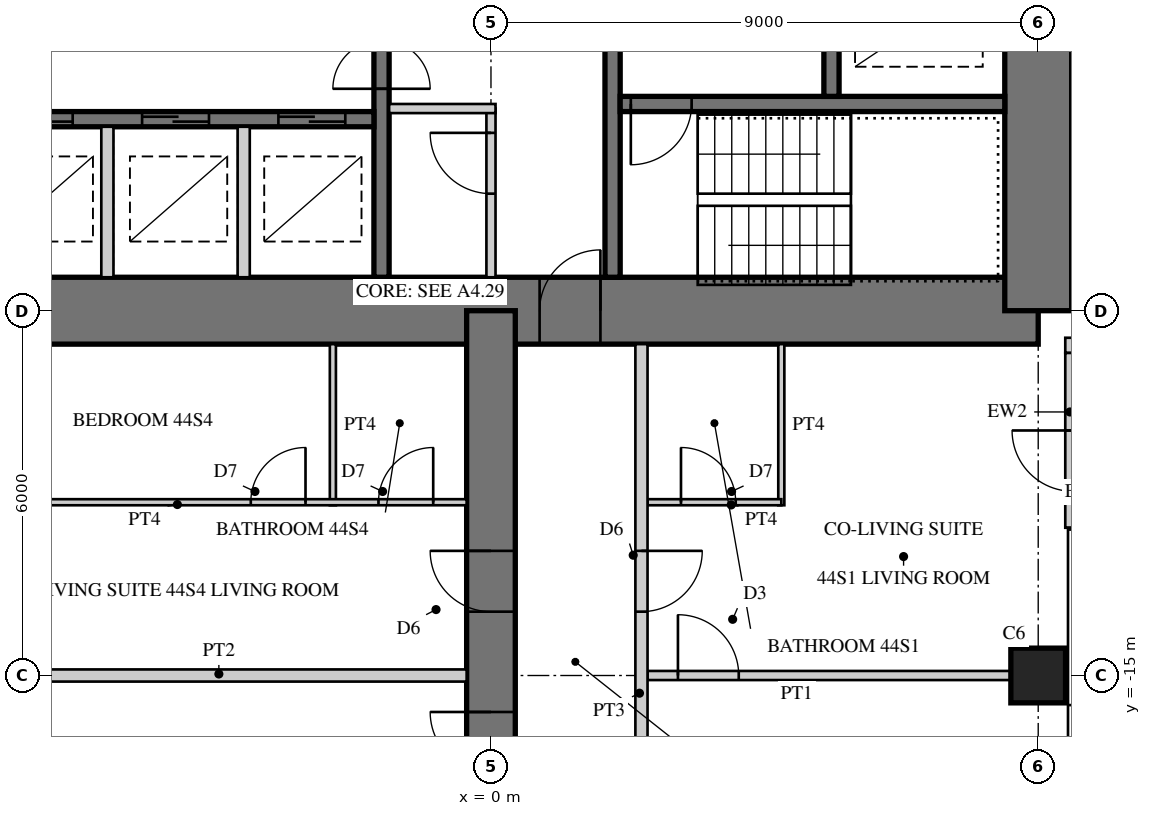
"""IFC4 building model, lengths in metres.
Left out: names, types, materials, properties, quantities, classifications, styles, units other than length and angle.
Written with IfcOpenShell. Run it as: python <this file> out.ifc"""

import sys

from ifc_helpers import new_model, si_unit, direction, frame, frame_2d, origin, origin_2d, place, context, subcontext, project, spatial, rectangle, hollow_rectangle, extrude, element, fill, save


model = new_model("IFC4")
c1 = context("Model", 3, precision=1e-05, world=origin(), true_north=direction((0.0, 1.0)))
c2 = subcontext(c1, "Body", "Model", "MODEL_VIEW")
j1 = project(units=[si_unit("LENGTHUNIT", "METRE"), si_unit("PLANEANGLEUNIT", "RADIAN")], contexts=[c1])
p1 = place(None, origin())
s1 = spatial("IfcSite", under=j1, at=p1, CompositionType="ELEMENT")
p2 = place(p1, origin())
s2 = spatial("IfcBuilding", under=s1, at=p2, CompositionType="ELEMENT")
p3 = place(p2, frame((0.0, 0.0, 179.7)))
s3 = spatial("IfcBuildingStorey", under=s2, at=p3, CompositionType="ELEMENT", Elevation=179.7)
p4 = place(p3, frame((-9.0, -9.0, 0.0), z_axis=(0.0, 0.0, 1.0), x_axis=(1.0, 0.0, 0.0)))
e1 = element("IfcWall", 1, at=p4, inside=s3, PredefinedType="SHEAR", context=c2, shape_type="SweptSolid", body=[
    extrude(rectangle(XDim=18.0, YDim=1.1, at=frame_2d((9.0, 0.0))), origin(), (0.0, 0.0, 1.0), 3.4),
])
p5 = place(p4, frame((9.8, 0.0, 0.0)))
e2 = element("IfcOpeningElement", 2, at=p5, cuts=e1, PredefinedType="OPENING", context=c2, shape_type="SweptSolid", body=[
    extrude(rectangle(XDim=1.0, YDim=2.4, at=frame_2d((0.5, 1.2))), frame((0.0, 0.56, 0.0), z_axis=(0.0, -1.0, 0.0), x_axis=(1.0, 0.0, 0.0)), (0.0, 0.0, 1.0), 1.12),
])
p6 = place(p3, frame((9.0, -9.0, 0.0), z_axis=(0.0, 0.0, 1.0), x_axis=(0.0, 1.0, 0.0)))
e3 = element("IfcWall", 3, at=p6, inside=s3, PredefinedType="SHEAR", context=c2, shape_type="SweptSolid", body=[
    extrude(rectangle(XDim=18.0, YDim=1.1, at=frame_2d((9.0, 0.0))), origin(), (0.0, 0.0, 1.0), 3.4),
])
p7 = place(p6, frame((9.8, 0.0, 0.0)))
e4 = element("IfcOpeningElement", 4, at=p7, cuts=e3, PredefinedType="OPENING", context=c2, shape_type="SweptSolid", body=[
    extrude(rectangle(XDim=1.0, YDim=2.4, at=frame_2d((0.5, 1.2))), frame((0.0, 0.56, 0.0), z_axis=(0.0, -1.0, 0.0), x_axis=(1.0, 0.0, 0.0)), (0.0, 0.0, 1.0), 1.12),
])
p8 = place(p3, frame((-1.8, -1.875, 0.0), z_axis=(0.0, 0.0, 1.0), x_axis=(0.0, -1.0, 0.0)))
e5 = element("IfcWall", 5, at=p8, inside=s3, PredefinedType="SHEAR", context=c2, shape_type="SweptSolid", body=[
    extrude(rectangle(XDim=6.575, YDim=0.25, at=frame_2d((3.288, 0.0))), origin(), (0.0, 0.0, 1.0), 3.4),
])
p9 = place(p8, frame((1.875, 0.0, 0.0)))
e6 = element("IfcOpeningElement", 6, at=p9, cuts=e5, PredefinedType="OPENING", context=c2, shape_type="SweptSolid", body=[
    extrude(rectangle(XDim=1.6, YDim=2.4, at=frame_2d((0.8, 1.2))), frame((0.0, 0.135, 0.0), z_axis=(0.0, -1.0, 0.0), x_axis=(1.0, 0.0, 0.0)), (0.0, 0.0, 1.0), 0.27),
])
p10 = place(p3, frame((-1.925, -5.85, 0.0), z_axis=(0.0, 0.0, 1.0), x_axis=(-1.0, 0.0, 0.0)))
e7 = element("IfcWall", 7, at=p10, inside=s3, PredefinedType="SHEAR", context=c2, shape_type="SweptSolid", body=[
    extrude(rectangle(XDim=6.525, YDim=0.25, at=frame_2d((3.262, 0.0))), origin(), (0.0, 0.0, 1.0), 3.4),
])
p11 = place(p10, frame((0.471, 0.0, 0.0)))
e8 = element("IfcOpeningElement", 8, at=p11, cuts=e7, PredefinedType="OPENING", context=c2, shape_type="SweptSolid", body=[
    extrude(rectangle(XDim=1.1, YDim=2.2, at=frame_2d((0.55, 1.1))), frame((0.0, 0.135, 0.0), z_axis=(0.0, -1.0, 0.0), x_axis=(1.0, 0.0, 0.0)), (0.0, 0.0, 1.0), 0.27),
])
p12 = place(p10, frame((2.712, 0.0, 0.0)))
e9 = element("IfcOpeningElement", 9, at=p12, cuts=e7, PredefinedType="OPENING", context=c2, shape_type="SweptSolid", body=[
    extrude(rectangle(XDim=1.1, YDim=2.2, at=frame_2d((0.55, 1.1))), frame((0.0, 0.135, 0.0), z_axis=(0.0, -1.0, 0.0), x_axis=(1.0, 0.0, 0.0)), (0.0, 0.0, 1.0), 0.27),
])
p13 = place(p10, frame((4.954, 0.0, 0.0)))
e10 = element("IfcOpeningElement", 10, at=p13, cuts=e7, PredefinedType="OPENING", context=c2, shape_type="SweptSolid", body=[
    extrude(rectangle(XDim=1.1, YDim=2.2, at=frame_2d((0.55, 1.1))), frame((0.0, 0.135, 0.0), z_axis=(0.0, -1.0, 0.0), x_axis=(1.0, 0.0, 0.0)), (0.0, 0.0, 1.0), 0.27),
])
for number, where, z_axis, x_axis in (
    (11, (-4.067, -5.975, 0.0), (0.0, 0.0, 1.0), (0.0, -1.0, 0.0)),
    (12, (-6.308, -5.975, 0.0), (0.0, 0.0, 1.0), (0.0, -1.0, 0.0)),
):
    element("IfcWall", number, at=place(p3, frame(where, z_axis=z_axis, x_axis=x_axis)), inside=s3, PredefinedType="PARTITIONING", context=c2, shape_type="SweptSolid", body=[
        extrude(rectangle(XDim=2.475, YDim=0.2, at=frame_2d((1.237, 0.0))), origin(), (0.0, 0.0, 1.0), 3.4),
    ])
p14 = place(p3, frame((2.0, -1.675, 0.0), z_axis=(0.0, 0.0, 1.0), x_axis=(0.0, -1.0, 0.0)))
e13 = element("IfcWall", 13, at=p14, inside=s3, PredefinedType="SHEAR", context=c2, shape_type="SweptSolid", body=[
    extrude(rectangle(XDim=6.775, YDim=0.25, at=frame_2d((3.387, 0.0))), origin(), (0.0, 0.0, 1.0), 3.4),
])
p15 = place(p14, frame((0.725, 0.0, 0.0)))
e14 = element("IfcOpeningElement", 14, at=p15, cuts=e13, PredefinedType="OPENING", context=c2, shape_type="SweptSolid", body=[
    extrude(rectangle(XDim=1.0, YDim=2.1, at=frame_2d((0.5, 1.05))), frame((0.0, 0.135, 0.0), z_axis=(0.0, -1.0, 0.0), x_axis=(1.0, 0.0, 0.0)), (0.0, 0.0, 1.0), 0.27),
])
p16 = place(p3, frame((2.125, -5.6, 0.0), z_axis=(0.0, 0.0, 1.0), x_axis=(1.0, 0.0, 0.0)))
e15 = element("IfcWall", 15, at=p16, inside=s3, PredefinedType="SHEAR", context=c2, shape_type="SweptSolid", body=[
    extrude(rectangle(XDim=6.325, YDim=0.25, at=frame_2d((3.163, 0.0))), origin(), (0.0, 0.0, 1.0), 3.4),
])
p17 = place(p16, frame((0.175, 0.0, 0.0)))
e16 = element("IfcOpeningElement", 16, at=p17, cuts=e15, PredefinedType="OPENING", context=c2, shape_type="SweptSolid", body=[
    extrude(rectangle(XDim=1.0, YDim=2.1, at=frame_2d((0.5, 1.05))), frame((0.0, 0.135, 0.0), z_axis=(0.0, -1.0, 0.0), x_axis=(1.0, 0.0, 0.0)), (0.0, 0.0, 1.0), 0.27),
])
p18 = place(p3, frame((5.6, -1.925, 0.0), z_axis=(0.0, 0.0, 1.0), x_axis=(0.0, -1.0, 0.0)))
e17 = element("IfcWall", 17, at=p18, inside=s3, PredefinedType="SHEAR", context=c2, shape_type="SweptSolid", body=[
    extrude(rectangle(XDim=3.55, YDim=0.25, at=frame_2d((1.775, 0.0))), origin(), (0.0, 0.0, 1.0), 3.4),
])
p19 = place(p18, frame((1.525, 0.0, 0.0)))
e18 = element("IfcOpeningElement", 18, at=p19, cuts=e17, PredefinedType="OPENING", context=c2, shape_type="SweptSolid", body=[
    extrude(rectangle(XDim=1.1, YDim=2.2, at=frame_2d((0.55, 1.1))), frame((0.0, 0.135, 0.0), z_axis=(0.0, -1.0, 0.0), x_axis=(1.0, 0.0, 0.0)), (0.0, 0.0, 1.0), 0.27),
])
p20 = place(p18, frame((0.075, 0.0, 0.0)))
e19 = element("IfcOpeningElement", 19, at=p20, cuts=e17, PredefinedType="OPENING", context=c2, shape_type="SweptSolid", body=[
    extrude(rectangle(XDim=0.8, YDim=2.1, at=frame_2d((0.4, 1.05))), frame((0.0, 0.135, 0.0), z_axis=(0.0, -1.0, 0.0), x_axis=(1.0, 0.0, 0.0)), (0.0, 0.0, 1.0), 0.27),
])
p21 = place(p3, frame((0.0, -9.0, 0.0), z_axis=(0.0, 0.0, 1.0), x_axis=(0.0, -1.0, 0.0)))
e20 = element("IfcWall", 20, at=p21, inside=s3, PredefinedType="SHEAR", context=c2, shape_type="SweptSolid", body=[
    extrude(rectangle(XDim=18.0, YDim=0.8, at=frame_2d((9.0, 0.0))), origin(), (0.0, 0.0, 1.0), 3.4),
])
p22 = place(p21, frame((3.95, 0.0, 0.0)))
e21 = element("IfcOpeningElement", 21, at=p22, cuts=e20, PredefinedType="OPENING", context=c2, shape_type="SweptSolid", body=[
    extrude(rectangle(XDim=1.0, YDim=2.15, at=frame_2d((0.5, 1.075))), frame((0.0, 0.41, 0.0), z_axis=(0.0, -1.0, 0.0), x_axis=(1.0, 0.0, 0.0)), (0.0, 0.0, 1.0), 0.82),
])
p23 = place(p21, frame((6.6, 0.0, 0.0)))
e22 = element("IfcOpeningElement", 22, at=p23, cuts=e20, PredefinedType="OPENING", context=c2, shape_type="SweptSolid", body=[
    extrude(rectangle(XDim=1.0, YDim=2.15, at=frame_2d((0.5, 1.075))), frame((0.0, 0.41, 0.0), z_axis=(0.0, -1.0, 0.0), x_axis=(1.0, 0.0, 0.0)), (0.0, 0.0, 1.0), 0.82),
])
p24 = place(p21, frame((13.25, 0.0, 0.0)))
e23 = element("IfcOpeningElement", 23, at=p24, cuts=e20, PredefinedType="OPENING", context=c2, shape_type="SweptSolid", body=[
    extrude(rectangle(XDim=1.0, YDim=2.2, at=frame_2d((0.5, 1.1))), frame((0.0, 0.41, 0.0), z_axis=(0.0, -1.0, 0.0), x_axis=(1.0, 0.0, 0.0)), (0.0, 0.0, 1.0), 0.82),
])
p25 = place(p3, frame((9.0, -15.0, 0.0), z_axis=(0.0, 0.0, 1.0), x_axis=(1.0, 0.0, 0.0)))
e24 = element("IfcColumn", 24, at=p25, inside=s3, PredefinedType="COLUMN", context=c2, shape_type="SweptSolid", body=[
    extrude(rectangle(XDim=0.9, YDim=0.9, at=origin_2d()), origin(), (0.0, 0.0, 1.0), 3.4),
])
p26 = place(p3, frame((9.445, -9.57, 0.0), z_axis=(0.0, 0.0, 1.0), x_axis=(1.0, 0.0, 0.0)))
e25 = element("IfcWall", 25, at=p26, inside=s3, PredefinedType="SOLIDWALL", context=c2, shape_type="SweptSolid", body=[
    extrude(rectangle(XDim=3.125, YDim=0.25, at=frame_2d((1.562, 0.0))), origin(), (0.0, 0.0, 1.0), 3.22),
])
p27 = place(p26, frame((0.6, 0.0, 0.0)))
e26 = element("IfcOpeningElement", 26, at=p27, cuts=e25, PredefinedType="OPENING", context=c2, shape_type="SweptSolid", body=[
    extrude(rectangle(XDim=1.0, YDim=2.2, at=frame_2d((0.5, 1.1))), frame((0.0, 0.135, 0.0), z_axis=(0.0, -1.0, 0.0), x_axis=(1.0, 0.0, 0.0)), (0.0, 0.0, 1.0), 0.27),
])
p28 = place(p3, frame((9.57, -12.57, 0.0), z_axis=(0.0, 0.0, 1.0), x_axis=(0.0, 1.0, 0.0)))
e27 = element("IfcWall", 27, at=p28, inside=s3, PredefinedType="SOLIDWALL", context=c2, shape_type="SweptSolid", body=[
    extrude(rectangle(XDim=2.875, YDim=0.25, at=frame_2d((1.438, 0.0))), origin(), (0.0, 0.0, 1.0), 3.22),
])
p29 = place(p28, frame((0.6, 0.0, 0.0)))
e28 = element("IfcOpeningElement", 28, at=p29, cuts=e27, PredefinedType="OPENING", context=c2, shape_type="SweptSolid", body=[
    extrude(rectangle(XDim=1.0, YDim=2.2, at=frame_2d((0.5, 1.1))), frame((0.0, 0.135, 0.0), z_axis=(0.0, -1.0, 0.0), x_axis=(1.0, 0.0, 0.0)), (0.0, 0.0, 1.0), 0.27),
])
p30 = place(p3, frame((0.0, -5.675, 0.0), z_axis=(0.0, 0.0, 1.0), x_axis=(0.0, -1.0, 0.0)))
e29 = element("IfcWall", 29, at=p30, inside=s3, PredefinedType="PARTITIONING", context=c2, shape_type="SweptSolid", body=[
    extrude(rectangle(XDim=2.775, YDim=0.15, at=frame_2d((1.387, 0.0))), origin(), (0.0, 0.0, 1.0), 3.22),
])
p31 = place(p30, frame((0.4, 0.0, 0.0)))
e30 = element("IfcOpeningElement", 30, at=p31, cuts=e29, PredefinedType="OPENING", context=c2, shape_type="SweptSolid", body=[
    extrude(rectangle(XDim=1.0, YDim=2.1, at=frame_2d((0.5, 1.05))), frame((0.0, 0.085, 0.0), z_axis=(0.0, -1.0, 0.0), x_axis=(1.0, 0.0, 0.0)), (0.0, 0.0, 1.0), 0.17),
])
p32 = place(p3, frame((-1.675, -5.675, 0.0), z_axis=(0.0, 0.0, 1.0), x_axis=(1.0, 0.0, 0.0)))
e31 = element("IfcWall", 31, at=p32, inside=s3, PredefinedType="PARTITIONING", context=c2, shape_type="SweptSolid", body=[
    extrude(rectangle(XDim=1.75, YDim=0.15, at=frame_2d((0.875, 0.0))), origin(), (0.0, 0.0, 1.0), 3.22),
])
p33 = place(p3, frame((4.775, -9.55, 0.0), z_axis=(0.0, 0.0, 1.0), x_axis=(0.0, -1.0, 0.0)))
e32 = element("IfcWall", 32, at=p33, inside=s3, PredefinedType="PARTITIONING", context=c2, shape_type="SweptSolid", body=[
    extrude(rectangle(XDim=2.65, YDim=0.1, at=frame_2d((1.325, 0.0))), origin(), (0.0, 0.0, 1.0), 3.22),
])
p34 = place(p3, frame((2.575, -12.15, 0.0), z_axis=(0.0, 0.0, 1.0), x_axis=(1.0, 0.0, 0.0)))
e33 = element("IfcWall", 33, at=p34, inside=s3, PredefinedType="PARTITIONING", context=c2, shape_type="SweptSolid", body=[
    extrude(rectangle(XDim=2.2, YDim=0.1, at=frame_2d((1.1, 0.0))), origin(), (0.0, 0.0, 1.0), 3.22),
])
p35 = place(p34, frame((0.55, 0.0, 0.0)))
e34 = element("IfcOpeningElement", 34, at=p35, cuts=e33, PredefinedType="OPENING", context=c2, shape_type="SweptSolid", body=[
    extrude(rectangle(XDim=0.9, YDim=2.1, at=frame_2d((0.45, 1.05))), frame((0.0, 0.06, 0.0), z_axis=(0.0, -1.0, 0.0), x_axis=(1.0, 0.0, 0.0)), (0.0, 0.0, 1.0), 0.12),
])
p36 = place(p3, frame((2.575, -15.0, 0.0), z_axis=(0.0, 0.0, 1.0), x_axis=(1.0, 0.0, 0.0)))
e35 = element("IfcWall", 35, at=p36, inside=s3, PredefinedType="PARTITIONING", context=c2, shape_type="SweptSolid", body=[
    extrude(rectangle(XDim=5.975, YDim=0.15, at=frame_2d((2.988, 0.0))), origin(), (0.0, 0.0, 1.0), 2.47),
])
p37 = place(p36, frame((0.5, 0.0, 0.0)))
e36 = element("IfcOpeningElement", 36, at=p37, cuts=e35, PredefinedType="OPENING", context=c2, shape_type="SweptSolid", body=[
    extrude(rectangle(XDim=1.0, YDim=2.1, at=frame_2d((0.5, 1.05))), frame((0.0, 0.085, 0.0), z_axis=(0.0, -1.0, 0.0), x_axis=(1.0, 0.0, 0.0)), (0.0, 0.0, 1.0), 0.17),
])
p38 = place(p3, frame((-2.6, -9.55, 0.0), z_axis=(0.0, 0.0, 1.0), x_axis=(0.0, -1.0, 0.0)))
e37 = element("IfcWall", 37, at=p38, inside=s3, PredefinedType="PARTITIONING", context=c2, shape_type="SweptSolid", body=[
    extrude(rectangle(XDim=2.65, YDim=0.1, at=frame_2d((1.325, 0.0))), origin(), (0.0, 0.0, 1.0), 3.22),
])
p39 = place(p3, frame((-9.445, -12.15, 0.0), z_axis=(0.0, 0.0, 1.0), x_axis=(1.0, 0.0, 0.0)))
e38 = element("IfcWall", 38, at=p39, inside=s3, PredefinedType="PARTITIONING", context=c2, shape_type="SweptSolid", body=[
    extrude(rectangle(XDim=9.045, YDim=0.1, at=frame_2d((4.522, 0.0))), origin(), (0.0, 0.0, 1.0), 3.22),
])
p40 = place(p39, frame((5.495, 0.0, 0.0)))
e39 = element("IfcOpeningElement", 39, at=p40, cuts=e38, PredefinedType="OPENING", context=c2, shape_type="SweptSolid", body=[
    extrude(rectangle(XDim=0.9, YDim=2.1, at=frame_2d((0.45, 1.05))), frame((0.0, 0.06, 0.0), z_axis=(0.0, -1.0, 0.0), x_axis=(1.0, 0.0, 0.0)), (0.0, 0.0, 1.0), 0.12),
])
p41 = place(p39, frame((7.595, 0.0, 0.0)))
e40 = element("IfcOpeningElement", 40, at=p41, cuts=e38, PredefinedType="OPENING", context=c2, shape_type="SweptSolid", body=[
    extrude(rectangle(XDim=0.9, YDim=2.1, at=frame_2d((0.45, 1.05))), frame((0.0, 0.06, 0.0), z_axis=(0.0, -1.0, 0.0), x_axis=(1.0, 0.0, 0.0)), (0.0, 0.0, 1.0), 0.12),
])
p42 = place(p3, frame((-8.55, -15.0, 0.0), z_axis=(0.0, 0.0, 1.0), x_axis=(1.0, 0.0, 0.0)))
e41 = element("IfcWall", 41, at=p42, inside=s3, PredefinedType="SOLIDWALL", context=c2, shape_type="SweptSolid", body=[
    extrude(rectangle(XDim=8.15, YDim=0.2, at=frame_2d((4.075, 0.0))), origin(), (0.0, 0.0, 1.0), 2.47),
])
p43 = place(p3, frame((2.475, -9.55, 0.0), z_axis=(0.0, 0.0, 1.0), x_axis=(0.0, -1.0, 0.0)))
e42 = element("IfcWall", 42, at=p43, inside=s3, PredefinedType="SOLIDWALL", context=c2, shape_type="SweptSolid", body=[
    extrude(rectangle(XDim=11.45, YDim=0.2, at=frame_2d((5.725, 0.0))), origin(), (0.0, 0.0, 1.0), 3.22),
])
p44 = place(p43, frame((3.4, 0.0, 0.0)))
e43 = element("IfcOpeningElement", 43, at=p44, cuts=e42, PredefinedType="OPENING", context=c2, shape_type="SweptSolid", body=[
    extrude(rectangle(XDim=1.0, YDim=2.15, at=frame_2d((0.5, 1.075))), frame((0.0, 0.11, 0.0), z_axis=(0.0, -1.0, 0.0), x_axis=(1.0, 0.0, 0.0)), (0.0, 0.0, 1.0), 0.22),
])
p45 = place(p29, origin())
e44 = element("IfcDoor", 44, at=p45, inside=s3, OperationType="SINGLE_SWING_RIGHT", PredefinedType="DOOR", context=c2, shape_type="SweptSolid", body=[
    extrude(hollow_rectangle(XDim=1.0, YDim=2.2, WallThickness=0.06, at=frame_2d((0.5, 1.1))), frame((0.0, 0.025, 0.0), z_axis=(0.0, -1.0, 0.0), x_axis=(1.0, 0.0, 0.0)), (0.0, 0.0, 1.0), 0.05),
    extrude(rectangle(XDim=0.879, YDim=2.079, at=frame_2d((0.5, 1.1))), frame((0.0, 0.025, 0.0), z_axis=(0.0, -1.0, 0.0), x_axis=(1.0, 0.0, 0.0)), (0.0, 0.0, 1.0), 0.05),
])
fill(e28, e44)
p46 = place(p31, frame((1.0, 0.0, 0.0), z_axis=(0.0, 0.0, 1.0), x_axis=(-1.0, 0.0, 0.0)))
e45 = element("IfcDoor", 45, at=p46, inside=s3, OperationType="SINGLE_SWING_RIGHT", PredefinedType="DOOR", context=c2, shape_type="SweptSolid", body=[
    extrude(rectangle(XDim=1.0, YDim=2.1, at=frame_2d((0.5, 1.05))), frame((0.0, 0.025, 0.0), z_axis=(0.0, -1.0, 0.0), x_axis=(1.0, 0.0, 0.0)), (0.0, 0.0, 1.0), 0.05),
])
fill(e30, e45)
p47 = place(p35, origin())
e46 = element("IfcDoor", 46, at=p47, inside=s3, OperationType="SINGLE_SWING_LEFT", PredefinedType="DOOR", context=c2, shape_type="SweptSolid", body=[
    extrude(rectangle(XDim=0.9, YDim=2.1, at=frame_2d((0.45, 1.05))), frame((0.0, 0.025, 0.0), z_axis=(0.0, -1.0, 0.0), x_axis=(1.0, 0.0, 0.0)), (0.0, 0.0, 1.0), 0.05),
])
fill(e34, e46)
p48 = place(p37, origin())
e47 = element("IfcDoor", 47, at=p48, inside=s3, OperationType="SINGLE_SWING_LEFT", PredefinedType="DOOR", context=c2, shape_type="SweptSolid", body=[
    extrude(rectangle(XDim=1.0, YDim=2.1, at=frame_2d((0.5, 1.05))), frame((0.0, 0.025, 0.0), z_axis=(0.0, -1.0, 0.0), x_axis=(1.0, 0.0, 0.0)), (0.0, 0.0, 1.0), 0.05),
])
fill(e36, e47)
p49 = place(p40, origin())
e48 = element("IfcDoor", 48, at=p49, inside=s3, OperationType="SINGLE_SWING_RIGHT", PredefinedType="DOOR", context=c2, shape_type="SweptSolid", body=[
    extrude(rectangle(XDim=0.9, YDim=2.1, at=frame_2d((0.45, 1.05))), frame((0.0, 0.025, 0.0), z_axis=(0.0, -1.0, 0.0), x_axis=(1.0, 0.0, 0.0)), (0.0, 0.0, 1.0), 0.05),
])
fill(e39, e48)
p50 = place(p41, origin())
e49 = element("IfcDoor", 49, at=p50, inside=s3, OperationType="SINGLE_SWING_RIGHT", PredefinedType="DOOR", context=c2, shape_type="SweptSolid", body=[
    extrude(rectangle(XDim=0.9, YDim=2.1, at=frame_2d((0.45, 1.05))), frame((0.0, 0.025, 0.0), z_axis=(0.0, -1.0, 0.0), x_axis=(1.0, 0.0, 0.0)), (0.0, 0.0, 1.0), 0.05),
])
fill(e40, e49)
p51 = place(p44, origin())
e50 = element("IfcDoor", 50, at=p51, inside=s3, OperationType="SINGLE_SWING_LEFT", PredefinedType="DOOR", context=c2, shape_type="SweptSolid", body=[
    extrude(rectangle(XDim=1.0, YDim=2.15, at=frame_2d((0.5, 1.075))), frame((0.0, 0.025, 0.0), z_axis=(0.0, -1.0, 0.0), x_axis=(1.0, 0.0, 0.0)), (0.0, 0.0, 1.0), 0.05),
])
fill(e43, e50)
p52 = place(p22, frame((1.0, 0.0, 0.0), z_axis=(0.0, 0.0, 1.0), x_axis=(-1.0, 0.0, 0.0)))
e51 = element("IfcDoor", 51, at=p52, inside=s3, OperationType="SINGLE_SWING_RIGHT", PredefinedType="DOOR", context=c2, shape_type="SweptSolid", body=[
    extrude(rectangle(XDim=1.0, YDim=2.15, at=frame_2d((0.5, 1.075))), frame((0.0, 0.025, 0.0), z_axis=(0.0, -1.0, 0.0), x_axis=(1.0, 0.0, 0.0)), (0.0, 0.0, 1.0), 0.05),
])
fill(e21, e51)
p53 = place(p23, frame((1.0, 0.0, 0.0), z_axis=(0.0, 0.0, 1.0), x_axis=(-1.0, 0.0, 0.0)))
e52 = element("IfcDoor", 52, at=p53, inside=s3, OperationType="SINGLE_SWING_RIGHT", PredefinedType="DOOR", context=c2, shape_type="SweptSolid", body=[
    extrude(rectangle(XDim=1.0, YDim=2.15, at=frame_2d((0.5, 1.075))), frame((0.0, 0.025, 0.0), z_axis=(0.0, -1.0, 0.0), x_axis=(1.0, 0.0, 0.0)), (0.0, 0.0, 1.0), 0.05),
])
fill(e22, e52)
p54 = place(p5, origin())
e53 = element("IfcDoor", 53, at=p54, inside=s3, OperationType="SINGLE_SWING_RIGHT", PredefinedType="DOOR", context=c2, shape_type="SweptSolid", body=[
    extrude(rectangle(XDim=1.0, YDim=2.4, at=frame_2d((0.5, 1.2))), frame((0.0, 0.055, 0.0), z_axis=(0.0, -1.0, 0.0), x_axis=(1.0, 0.0, 0.0)), (0.0, 0.0, 1.0), 0.05),
])
fill(e2, e53)
p55 = place(p11, origin())
e54 = element("IfcDoor", 54, at=p55, inside=s3, OperationType="DOUBLE_DOOR_SLIDING", PredefinedType="DOOR", context=c2, shape_type="SweptSolid", body=[
    extrude(rectangle(XDim=1.1, YDim=2.2, at=frame_2d((0.55, 1.1))), frame((0.0, 0.025, 0.0), z_axis=(0.0, -1.0, 0.0), x_axis=(1.0, 0.0, 0.0)), (0.0, 0.0, 1.0), 0.05),
])
fill(e8, e54)
p56 = place(p12, origin())
e55 = element("IfcDoor", 55, at=p56, inside=s3, OperationType="DOUBLE_DOOR_SLIDING", PredefinedType="DOOR", context=c2, shape_type="SweptSolid", body=[
    extrude(rectangle(XDim=1.1, YDim=2.2, at=frame_2d((0.55, 1.1))), frame((0.0, 0.025, 0.0), z_axis=(0.0, -1.0, 0.0), x_axis=(1.0, 0.0, 0.0)), (0.0, 0.0, 1.0), 0.05),
])
fill(e9, e55)
p57 = place(p13, origin())
e56 = element("IfcDoor", 56, at=p57, inside=s3, OperationType="DOUBLE_DOOR_SLIDING", PredefinedType="DOOR", context=c2, shape_type="SweptSolid", body=[
    extrude(rectangle(XDim=1.1, YDim=2.2, at=frame_2d((0.55, 1.1))), frame((0.0, 0.025, 0.0), z_axis=(0.0, -1.0, 0.0), x_axis=(1.0, 0.0, 0.0)), (0.0, 0.0, 1.0), 0.05),
])
fill(e10, e56)
p58 = place(p9, origin())
e57 = element("IfcDoor", 57, at=p58, inside=s3, OperationType="DOUBLE_DOOR_DOUBLE_SWING", PredefinedType="DOOR", context=c2, shape_type="SweptSolid", body=[
    extrude(rectangle(XDim=1.6, YDim=2.4, at=frame_2d((0.8, 1.2))), frame((0.0, 0.025, 0.0), z_axis=(0.0, -1.0, 0.0), x_axis=(1.0, 0.0, 0.0)), (0.0, 0.0, 1.0), 0.05),
])
fill(e6, e57)
p59 = place(p17, frame((1.0, 0.0, 0.0), z_axis=(0.0, 0.0, 1.0), x_axis=(-1.0, 0.0, 0.0)))
e58 = element("IfcDoor", 58, at=p59, inside=s3, OperationType="SINGLE_SWING_RIGHT", PredefinedType="DOOR", context=c2, shape_type="SweptSolid", body=[
    extrude(rectangle(XDim=1.0, YDim=2.1, at=frame_2d((0.5, 1.05))), frame((0.0, 0.025, 0.0), z_axis=(0.0, -1.0, 0.0), x_axis=(1.0, 0.0, 0.0)), (0.0, 0.0, 1.0), 0.05),
])
fill(e16, e58)
save(model, sys.argv[1])
